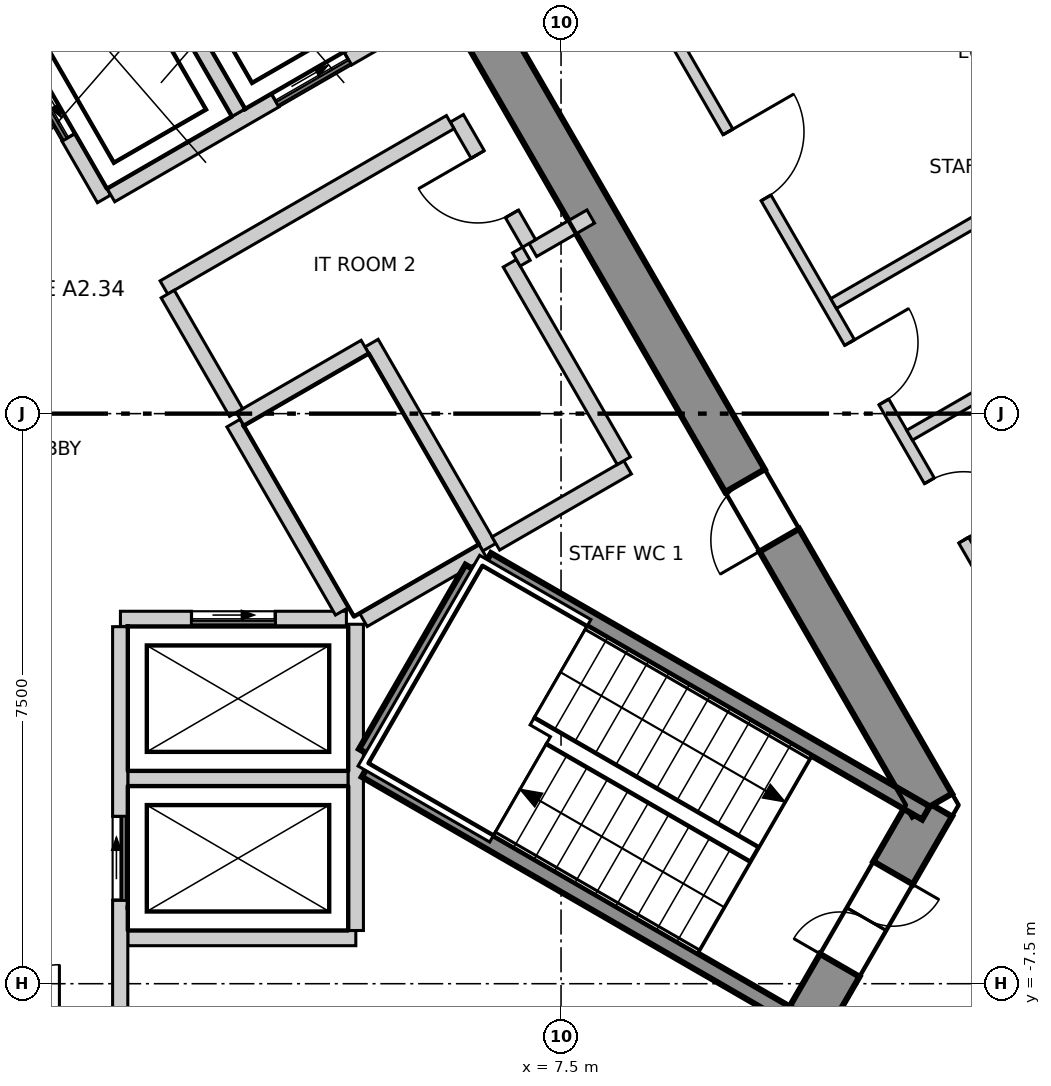
"""IFC4 building model, lengths in metres.
Left out: names, types, materials, properties, quantities, classifications, styles, units other than length and angle.
Written with IfcOpenShell. Run it as: python <this file> out.ifc"""

import sys

from ifc_helpers import new_model, si_unit, direction, frame, frame_2d, origin, place, context, subcontext, project, spatial, polyline, rectangle, outline, extrude, element, fill, save


model = new_model("IFC4")
c1 = context("Model", 3, precision=1e-05, world=origin(), true_north=direction((0.0, 1.0)))
c2 = subcontext(c1, "Body", "Model", "MODEL_VIEW")
j1 = project(units=[si_unit("LENGTHUNIT", "METRE"), si_unit("PLANEANGLEUNIT", "RADIAN")], contexts=[c1])
p1 = place(None, origin())
s1 = spatial("IfcSite", under=j1, at=p1, CompositionType="ELEMENT")
p2 = place(p1, origin())
s2 = spatial("IfcBuilding", under=s1, at=p2, CompositionType="ELEMENT")
p3 = place(p2, frame((0.0, 0.0, 289.9)))
s3 = spatial("IfcBuildingStorey", under=s2, at=p3, CompositionType="ELEMENT", Elevation=289.9)
p4 = place(p3, frame((10.652, -8.15, -0.3), z_axis=(0.0, 0.0, 1.0), x_axis=(0.49997462182, 0.866040055388, 0.0)))
e1 = element("IfcWall", 1, at=p4, inside=s3, PredefinedType="SHEAR", context=c2, shape_type="SweptSolid", body=[
    extrude(outline(polyline([(-0.173, -0.3), (1.732, -0.301), (3.638, -0.301), (3.291, 0.3), (1.732, 0.3), (0.173, 0.3), (-0.173, -0.3)])), origin(), (0.0, 0.0, 1.0), 3.6),
])
p5 = place(p4, frame((1.032, 0.0, 0.3)))
e2 = element("IfcOpeningElement", 2, at=p5, cuts=e1, PredefinedType="OPENING", context=c2, shape_type="SweptSolid", body=[
    extrude(rectangle(XDim=1.4, YDim=2.1, at=frame_2d((0.7, 1.05))), frame((0.0, 0.31, 0.0), z_axis=(0.0, -1.0, 0.0), x_axis=(1.0, 0.0, 0.0)), (0.0, 0.0, 1.0), 0.621),
])
p6 = place(p3, frame((12.384, -5.15, -0.3), z_axis=(0.0, 0.0, 1.0), x_axis=(-0.500000539815, 0.866025092122, 0.0)))
e3 = element("IfcWall", 3, at=p6, inside=s3, PredefinedType="SHEAR", context=c2, shape_type="SweptSolid", body=[
    extrude(outline(polyline([(-0.173, -0.301), (1.795, -0.301), (3.763, -0.301), (5.731, -0.301), (7.7, -0.301), (9.668, -0.301), (11.636, -0.301), (13.604, -0.3), (15.573, -0.3), (17.541, -0.3), (19.509, -0.3), (21.477, -0.3), (21.131, 0.3), (19.226, 0.3), (17.321, 0.3), (15.415, 0.3), (13.51, 0.3), (11.605, 0.3), (9.699, 0.3), (7.794, 0.3), (5.889, 0.3), (3.984, 0.3), (2.078, 0.3), (0.173, 0.3), (-0.173, -0.301)])), origin(), (0.0, 0.0, 1.0), 3.6),
])
p7 = place(p6, frame((16.378, 0.0, 0.3)))
e4 = element("IfcOpeningElement", 4, at=p7, cuts=e3, PredefinedType="OPENING", context=c2, shape_type="SweptSolid", body=[
    extrude(rectangle(XDim=0.9, YDim=2.1, at=frame_2d((0.45, 1.05))), frame((0.0, 0.31, 0.0), z_axis=(0.0, -1.0, 0.0), x_axis=(1.0, 0.0, 0.0)), (0.0, 0.0, 1.0), 0.621),
])
p8 = place(p6, frame((4.026, 0.0, 0.3)))
e5 = element("IfcOpeningElement", 5, at=p8, cuts=e3, PredefinedType="OPENING", context=c2, shape_type="SweptSolid", body=[
    extrude(rectangle(XDim=0.9, YDim=2.1, at=frame_2d((0.45, 1.05))), frame((0.0, 0.31, 0.0), z_axis=(0.0, -1.0, 0.0), x_axis=(1.0, 0.0, 0.0)), (0.0, 0.0, 1.0), 0.621),
])
p9 = place(p3, frame((25.375, -11.77, 0.0), z_axis=(0.0, 0.0, 1.0), x_axis=(-0.500008134474, 0.866020707292, 0.0)))
e6 = element("IfcWall", 6, at=p9, inside=s3, PredefinedType="ELEMENTEDWALL", context=c2, shape_type="SweptSolid", body=[
    extrude(rectangle(XDim=45.741, YDim=0.2, at=frame_2d((22.871, 0.0))), origin(), (0.0, 0.0, 1.0), 3.3),
])
p10 = place(p9, frame((2.15, 0.0, 0.9)))
e7 = element("IfcOpeningElement", 7, at=p10, cuts=e6, PredefinedType="OPENING", context=c2, shape_type="SweptSolid", body=[
    extrude(rectangle(XDim=3.7, YDim=2.2, at=frame_2d((1.85, 1.1))), frame((0.0, 0.11, 0.0), z_axis=(0.0, -1.0, 0.0), x_axis=(1.0, 0.0, 0.0)), (0.0, 0.0, 1.0), 0.22),
])
p11 = place(p9, frame((7.544, 0.0, 0.9)))
e8 = element("IfcOpeningElement", 8, at=p11, cuts=e6, PredefinedType="OPENING", context=c2, shape_type="SweptSolid", body=[
    extrude(rectangle(XDim=3.7, YDim=2.2, at=frame_2d((1.85, 1.1))), frame((0.0, 0.11, 0.0), z_axis=(0.0, -1.0, 0.0), x_axis=(1.0, 0.0, 0.0)), (0.0, 0.0, 1.0), 0.22),
])
p12 = place(p9, frame((12.939, 0.0, 0.9)))
e9 = element("IfcOpeningElement", 9, at=p12, cuts=e6, PredefinedType="OPENING", context=c2, shape_type="SweptSolid", body=[
    extrude(rectangle(XDim=3.7, YDim=2.2, at=frame_2d((1.85, 1.1))), frame((0.0, 0.11, 0.0), z_axis=(0.0, -1.0, 0.0), x_axis=(1.0, 0.0, 0.0)), (0.0, 0.0, 1.0), 0.22),
])
p13 = place(p9, frame((18.333, 0.0, 0.9)))
e10 = element("IfcOpeningElement", 10, at=p13, cuts=e6, PredefinedType="OPENING", context=c2, shape_type="SweptSolid", body=[
    extrude(rectangle(XDim=3.7, YDim=2.2, at=frame_2d((1.85, 1.1))), frame((0.0, 0.11, 0.0), z_axis=(0.0, -1.0, 0.0), x_axis=(1.0, 0.0, 0.0)), (0.0, 0.0, 1.0), 0.22),
])
p14 = place(p9, frame((23.728, 0.0, 0.9)))
e11 = element("IfcOpeningElement", 11, at=p14, cuts=e6, PredefinedType="OPENING", context=c2, shape_type="SweptSolid", body=[
    extrude(rectangle(XDim=3.7, YDim=2.2, at=frame_2d((1.85, 1.1))), frame((0.0, 0.11, 0.0), z_axis=(0.0, -1.0, 0.0), x_axis=(1.0, 0.0, 0.0)), (0.0, 0.0, 1.0), 0.22),
])
p15 = place(p9, frame((29.122, 0.0, 0.9)))
e12 = element("IfcOpeningElement", 12, at=p15, cuts=e6, PredefinedType="OPENING", context=c2, shape_type="SweptSolid", body=[
    extrude(rectangle(XDim=3.7, YDim=2.2, at=frame_2d((1.85, 1.1))), frame((0.0, 0.11, 0.0), z_axis=(0.0, -1.0, 0.0), x_axis=(1.0, 0.0, 0.0)), (0.0, 0.0, 1.0), 0.22),
])
p16 = place(p9, frame((34.517, 0.0, 0.9)))
e13 = element("IfcOpeningElement", 13, at=p16, cuts=e6, PredefinedType="OPENING", context=c2, shape_type="SweptSolid", body=[
    extrude(rectangle(XDim=3.7, YDim=2.2, at=frame_2d((1.85, 1.1))), frame((0.0, 0.11, 0.0), z_axis=(0.0, -1.0, 0.0), x_axis=(1.0, 0.0, 0.0)), (0.0, 0.0, 1.0), 0.22),
])
p17 = place(p9, frame((39.911, 0.0, 0.9)))
e14 = element("IfcOpeningElement", 14, at=p17, cuts=e6, PredefinedType="OPENING", context=c2, shape_type="SweptSolid", body=[
    extrude(rectangle(XDim=3.7, YDim=2.2, at=frame_2d((1.85, 1.1))), frame((0.0, 0.11, 0.0), z_axis=(0.0, -1.0, 0.0), x_axis=(1.0, 0.0, 0.0)), (0.0, 0.0, 1.0), 0.22),
])
p18 = place(p3, frame((0.075, 20.37, 0.0), z_axis=(0.0, 0.0, 1.0), x_axis=(0.500009775255, -0.866019759965, 0.0)))
e15 = element("IfcWall", 15, at=p18, inside=s3, PredefinedType="PARTITIONING", context=c2, shape_type="SweptSolid", body=[
    extrude(rectangle(XDim=35.207, YDim=0.15, at=frame_2d((17.604, 0.0))), origin(), (0.0, 0.0, 1.0), 3.3),
])
p19 = place(p18, frame((31.407, 0.0, 0.0)))
e16 = element("IfcOpeningElement", 16, at=p19, cuts=e15, PredefinedType="OPENING", context=c2, shape_type="SweptSolid", body=[
    extrude(rectangle(XDim=1.0, YDim=2.1, at=frame_2d((0.5, 1.05))), frame((0.0, 0.085, 0.0), z_axis=(0.0, -1.0, 0.0), x_axis=(1.0, 0.0, 0.0)), (0.0, 0.0, 1.0), 0.17),
])
p20 = place(p18, frame((19.243, 0.0, 0.0)))
e17 = element("IfcOpeningElement", 17, at=p20, cuts=e15, PredefinedType="OPENING", context=c2, shape_type="SweptSolid", body=[
    extrude(rectangle(XDim=1.0, YDim=2.1, at=frame_2d((0.5, 1.05))), frame((0.0, 0.085, 0.0), z_axis=(0.0, -1.0, 0.0), x_axis=(1.0, 0.0, 0.0)), (0.0, 0.0, 1.0), 0.17),
])
p21 = place(p18, frame((24.543, 0.0, 0.0)))
e18 = element("IfcOpeningElement", 18, at=p21, cuts=e15, PredefinedType="OPENING", context=c2, shape_type="SweptSolid", body=[
    extrude(rectangle(XDim=0.9, YDim=2.1, at=frame_2d((0.45, 1.05))), frame((0.0, 0.085, 0.0), z_axis=(0.0, -1.0, 0.0), x_axis=(1.0, 0.0, 0.0)), (0.0, 0.0, 1.0), 0.17),
])
p22 = place(p18, frame((22.443, 0.0, 0.0)))
e19 = element("IfcOpeningElement", 19, at=p22, cuts=e15, PredefinedType="OPENING", context=c2, shape_type="SweptSolid", body=[
    extrude(rectangle(XDim=0.9, YDim=2.1, at=frame_2d((0.45, 1.05))), frame((0.0, 0.085, 0.0), z_axis=(0.0, -1.0, 0.0), x_axis=(1.0, 0.0, 0.0)), (0.0, 0.0, 1.0), 0.17),
])
p23 = place(p18, frame((13.253, 0.0, 0.0)))
e20 = element("IfcOpeningElement", 20, at=p23, cuts=e15, PredefinedType="OPENING", context=c2, shape_type="SweptSolid", body=[
    extrude(rectangle(XDim=1.0, YDim=2.1, at=frame_2d((0.5, 1.05))), frame((0.0, 0.085, 0.0), z_axis=(0.0, -1.0, 0.0), x_axis=(1.0, 0.0, 0.0)), (0.0, 0.0, 1.0), 0.17),
])
p24 = place(p18, frame((5.559, 0.0, 0.0)))
e21 = element("IfcOpeningElement", 21, at=p24, cuts=e15, PredefinedType="OPENING", context=c2, shape_type="SweptSolid", body=[
    extrude(rectangle(XDim=1.0, YDim=2.1, at=frame_2d((0.5, 1.05))), frame((0.0, 0.085, 0.0), z_axis=(0.0, -1.0, 0.0), x_axis=(1.0, 0.0, 0.0)), (0.0, 0.0, 1.0), 0.17),
])
p25 = place(p3, frame((11.086, 1.448, 0.0), z_axis=(0.0, 0.0, 1.0), x_axis=(0.8660395779, 0.499975448907, 0.0)))
e22 = element("IfcWall", 22, at=p25, inside=s3, PredefinedType="PARTITIONING", context=c2, shape_type="SweptSolid", body=[
    extrude(rectangle(XDim=2.45, YDim=0.15, at=frame_2d((1.225, 0.0))), origin(), (0.0, 0.0, 1.0), 3.3),
])
p26 = place(p3, frame((12.086, -0.284, 0.0), z_axis=(0.0, 0.0, 1.0), x_axis=(0.865995540999, 0.500051720295, 0.0)))
e23 = element("IfcWall", 23, at=p26, inside=s3, PredefinedType="PARTITIONING", context=c2, shape_type="SweptSolid", body=[
    extrude(rectangle(XDim=2.845, YDim=0.15, at=frame_2d((1.423, 0.0))), origin(), (0.0, 0.0, 1.0), 3.3),
])
p27 = place(p3, frame((1.8, -6.9, 0.0), z_axis=(0.0, 0.0, 1.0), x_axis=(1.0, 0.0, 0.0)))
e24 = element("IfcWall", 24, at=p27, inside=s3, PredefinedType="SOLIDWALL", context=c2, shape_type="SweptSolid", body=[
    extrude(rectangle(XDim=3.0, YDim=0.2, at=frame_2d((1.5, 0.0))), origin(), (0.0, 0.0, 1.0), 3.3),
])
p28 = place(p3, frame((1.8, -4.8, 0.0), z_axis=(0.0, 0.0, 1.0), x_axis=(1.0, 0.0, 0.0)))
e25 = element("IfcWall", 25, at=p28, inside=s3, PredefinedType="SOLIDWALL", context=c2, shape_type="SweptSolid", body=[
    extrude(rectangle(XDim=2.9, YDim=0.2, at=frame_2d((1.45, 0.0))), origin(), (0.0, 0.0, 1.0), 3.3),
])
p29 = place(p3, frame((1.703, -2.7, 0.0), z_axis=(0.0, 0.0, 1.0), x_axis=(1.0, 0.0, 0.0)))
e26 = element("IfcWall", 26, at=p29, inside=s3, PredefinedType="SOLIDWALL", context=c2, shape_type="SweptSolid", body=[
    extrude(rectangle(XDim=2.973, YDim=0.2, at=frame_2d((1.487, 0.0))), origin(), (0.0, 0.0, 1.0), 3.3),
])
p30 = place(p29, frame((0.936, 0.0, 0.0)))
e27 = element("IfcOpeningElement", 27, at=p30, cuts=e26, PredefinedType="OPENING", context=c2, shape_type="SweptSolid", body=[
    extrude(rectangle(XDim=1.1, YDim=2.1, at=frame_2d((0.55, 1.05))), frame((0.0, 0.11, 0.0), z_axis=(0.0, -1.0, 0.0), x_axis=(1.0, 0.0, 0.0)), (0.0, 0.0, 1.0), 0.22),
])
p31 = place(p3, frame((0.0, 5.4, 0.0), z_axis=(0.0, 0.0, 1.0), x_axis=(0.500103862429, -0.865965430478, 0.0)))
e28 = element("IfcWall", 28, at=p31, inside=s3, PredefinedType="SOLIDWALL", context=c2, shape_type="SweptSolid", body=[
    extrude(rectangle(XDim=2.973, YDim=0.2, at=frame_2d((1.487, 0.0))), origin(), (0.0, 0.0, 1.0), 3.3),
])
p32 = place(p31, frame((0.937, 0.0, 0.0)))
e29 = element("IfcOpeningElement", 29, at=p32, cuts=e28, PredefinedType="OPENING", context=c2, shape_type="SweptSolid", body=[
    extrude(rectangle(XDim=1.1, YDim=2.1, at=frame_2d((0.55, 1.05))), frame((0.0, 0.11, 0.0), z_axis=(0.0, -1.0, 0.0), x_axis=(1.0, 0.0, 0.0)), (0.0, 0.0, 1.0), 0.22),
])
p33 = place(p3, frame((3.19, -0.125, 0.0), z_axis=(0.0, 0.0, 1.0), x_axis=(0.499988658015, -0.866031951983, 0.0)))
e30 = element("IfcWall", 30, at=p33, inside=s3, PredefinedType="SOLIDWALL", context=c2, shape_type="SweptSolid", body=[
    extrude(rectangle(XDim=2.858, YDim=0.2, at=frame_2d((1.429, 0.0))), origin(), (0.0, 0.0, 1.0), 3.3),
])
p34 = place(p3, frame((1.578, 2.874, 0.0), z_axis=(0.0, 0.0, 1.0), x_axis=(0.866045911672, 0.499964477614, 0.0)))
e31 = element("IfcWall", 31, at=p34, inside=s3, PredefinedType="SOLIDWALL", context=c2, shape_type="SweptSolid", body=[
    extrude(rectangle(XDim=5.327, YDim=0.2, at=frame_2d((2.663, 0.0))), origin(), (0.0, 0.0, 1.0), 3.3),
])
p35 = place(p34, frame((2.496, 0.0, 0.0)))
e32 = element("IfcOpeningElement", 32, at=p35, cuts=e31, PredefinedType="OPENING", context=c2, shape_type="SweptSolid", body=[
    extrude(rectangle(XDim=1.1, YDim=2.1, at=frame_2d((0.55, 1.05))), frame((0.0, 0.11, 0.0), z_axis=(0.0, -1.0, 0.0), x_axis=(1.0, 0.0, 0.0)), (0.0, 0.0, 1.0), 0.22),
])
p36 = place(p3, frame((1.7, -8.13, 0.0), z_axis=(0.0, 0.0, 1.0), x_axis=(0.0, 1.0, 0.0)))
e33 = element("IfcWall", 33, at=p36, inside=s3, PredefinedType="SOLIDWALL", context=c2, shape_type="SweptSolid", body=[
    extrude(rectangle(XDim=5.327, YDim=0.2, at=frame_2d((2.664, 0.0))), origin(), (0.0, 0.0, 1.0), 3.3),
])
p37 = place(p36, frame((1.73, 0.0, 0.0)))
e34 = element("IfcOpeningElement", 34, at=p37, cuts=e33, PredefinedType="OPENING", context=c2, shape_type="SweptSolid", body=[
    extrude(rectangle(XDim=1.1, YDim=2.1, at=frame_2d((0.55, 1.05))), frame((0.0, 0.11, 0.0), z_axis=(0.0, -1.0, 0.0), x_axis=(1.0, 0.0, 0.0)), (0.0, 0.0, 1.0), 0.22),
])
p38 = place(p3, frame((4.8, -6.8, 0.0), z_axis=(0.0, 0.0, 1.0), x_axis=(0.0, 1.0, 0.0)))
e35 = element("IfcWall", 35, at=p38, inside=s3, PredefinedType="SOLIDWALL", context=c2, shape_type="SweptSolid", body=[
    extrude(rectangle(XDim=4.029, YDim=0.2, at=frame_2d((2.015, 0.0))), origin(), (0.0, 0.0, 1.0), 3.3),
])
p39 = place(p3, frame((1.807, 6.47, 0.0), z_axis=(0.0, 0.0, 1.0), x_axis=(0.50012328804, -0.865954211699, 0.0)))
e36 = element("IfcWall", 36, at=p39, inside=s3, PredefinedType="SOLIDWALL", context=c2, shape_type="SweptSolid", body=[
    extrude(rectangle(XDim=2.9, YDim=0.2, at=frame_2d((1.45, 0.0))), origin(), (0.0, 0.0, 1.0), 3.3),
])
p40 = place(p3, frame((5.007, 0.928, 0.0), z_axis=(0.0, 0.0, 1.0), x_axis=(0.499899694197, -0.866083307622, 0.0)))
e37 = element("IfcWall", 37, at=p40, inside=s3, PredefinedType="SOLIDWALL", context=c2, shape_type="SweptSolid", body=[
    extrude(rectangle(XDim=3.1, YDim=0.2, at=frame_2d((1.55, 0.0))), origin(), (0.0, 0.0, 1.0), 3.3),
])
p41 = place(p3, frame((3.278, -0.071, 0.0), z_axis=(0.0, 0.0, 1.0), x_axis=(0.865784509405, 0.500417009377, 0.0)))
e38 = element("IfcWall", 38, at=p41, inside=s3, PredefinedType="SOLIDWALL", context=c2, shape_type="SweptSolid", body=[
    extrude(rectangle(XDim=1.896, YDim=0.2, at=frame_2d((0.948, 0.0))), origin(), (0.0, 0.0, 1.0), 3.3),
])
p42 = place(p3, frame((7.129, 2.153, 0.0), z_axis=(0.0, 0.0, 1.0), x_axis=(0.866083962871, 0.499898558967, 0.0)))
e39 = element("IfcWall", 39, at=p42, inside=s3, PredefinedType="SOLIDWALL", context=c2, shape_type="SweptSolid", body=[
    extrude(rectangle(XDim=0.88, YDim=0.2, at=frame_2d((0.44, 0.0))), origin(), (0.0, 0.0, 1.0), 3.3),
])
p43 = place(p3, frame((6.129, 3.885, 0.0), z_axis=(0.0, 0.0, 1.0), x_axis=(0.499952260202, -0.866052964615, 0.0)))
e40 = element("IfcWall", 40, at=p43, inside=s3, PredefinedType="SOLIDWALL", context=c2, shape_type="SweptSolid", body=[
    extrude(rectangle(XDim=1.901, YDim=0.2, at=frame_2d((0.95, 0.0))), origin(), (0.0, 0.0, 1.0), 3.3),
])
p44 = place(p43, frame((0.55, 0.0, 0.0)))
e41 = element("IfcOpeningElement", 41, at=p44, cuts=e40, PredefinedType="OPENING", context=c2, shape_type="SweptSolid", body=[
    extrude(rectangle(XDim=0.9, YDim=2.1, at=frame_2d((0.45, 1.05))), frame((0.0, 0.11, 0.0), z_axis=(0.0, -1.0, 0.0), x_axis=(1.0, 0.0, 0.0)), (0.0, 0.0, 1.0), 0.22),
])
p45 = place(p3, frame((2.275, 1.66, 0.0), z_axis=(0.0, 0.0, 1.0), x_axis=(0.866013608182, 0.500020430026, 0.0)))
e42 = element("IfcWall", 42, at=p45, inside=s3, PredefinedType="SOLIDWALL", context=c2, shape_type="SweptSolid", body=[
    extrude(rectangle(XDim=4.35, YDim=0.2, at=frame_2d((2.175, 0.0))), origin(), (0.0, 0.0, 1.0), 3.3),
])
p46 = place(p3, frame((2.325, 1.573, 0.0), z_axis=(0.0, 0.0, 1.0), x_axis=(0.500004188491, -0.866022985545, 0.0)))
e43 = element("IfcWall", 43, at=p46, inside=s3, PredefinedType="SOLIDWALL", context=c2, shape_type="SweptSolid", body=[
    extrude(rectangle(XDim=1.8, YDim=0.2, at=frame_2d((0.9, 0.0))), origin(), (0.0, 0.0, 1.0), 3.3),
])
p47 = place(p3, frame((4.9, -2.714, 0.0), z_axis=(0.0, 0.0, 1.0), x_axis=(0.865846928409, 0.500309001083, 0.0)))
e44 = element("IfcWall", 44, at=p47, inside=s3, PredefinedType="SOLIDWALL", context=c2, shape_type="SweptSolid", body=[
    extrude(rectangle(XDim=1.813, YDim=0.2, at=frame_2d((0.907, 0.0))), origin(), (0.0, 0.0, 1.0), 3.3),
])
p48 = place(p3, frame((6.642, -1.708, 0.0), z_axis=(0.0, 0.0, 1.0), x_axis=(0.866043441391, 0.499968756647, 0.0)))
e45 = element("IfcWall", 45, at=p48, inside=s3, PredefinedType="SOLIDWALL", context=c2, shape_type="SweptSolid", body=[
    extrude(rectangle(XDim=2.002, YDim=0.2, at=frame_2d((1.001, 0.0))), origin(), (0.0, 0.0, 1.0), 3.3),
])
p49 = place(p3, frame((6.826, 1.978, 0.0), z_axis=(0.0, 0.0, 1.0), x_axis=(0.499990139034, -0.866031096941, 0.0)))
e46 = element("IfcWall", 46, at=p49, inside=s3, PredefinedType="SOLIDWALL", context=c2, shape_type="SweptSolid", body=[
    extrude(rectangle(XDim=3.0, YDim=0.2, at=frame_2d((1.5, 0.0))), origin(), (0.0, 0.0, 1.0), 3.3),
])
p50 = place(p3, frame((6.912, 2.028, 0.0), z_axis=(0.0, 0.0, 1.0), x_axis=(0.866559367082, 0.499074005857, 0.0)))
e47 = element("IfcWall", 47, at=p50, inside=s3, PredefinedType="SOLIDWALL", context=c2, shape_type="SweptSolid", body=[
    extrude(rectangle(XDim=0.152, YDim=0.2, at=frame_2d((0.076, 0.0))), origin(), (0.0, 0.0, 1.0), 3.3),
])
p51 = place(p3, frame((4.929, -4.693, 0.0), z_axis=(0.0, 0.0, 1.0), x_axis=(0.866005022404, -0.500035299925, 0.0)))
e48 = element("IfcWall", 48, at=p51, inside=s3, PredefinedType="SOLIDWALL", context=c2, shape_type="SweptSolid", body=[
    extrude(rectangle(XDim=6.665, YDim=0.2, at=frame_2d((3.333, 0.0))), origin(), (0.0, 0.0, 1.0), 3.3),
])
p52 = place(p3, frame((4.929, -4.462, 0.0), z_axis=(0.0, 0.0, 1.0), x_axis=(0.500200581029, 0.865909567298, 0.0)))
e49 = element("IfcWall", 49, at=p52, inside=s3, PredefinedType="SOLIDWALL", context=c2, shape_type="SweptSolid", body=[
    extrude(rectangle(XDim=2.799, YDim=0.2, at=frame_2d((1.399, 0.0))), origin(), (0.0, 0.0, 1.0), 3.3),
])
p53 = place(p3, frame((6.529, -1.922, 0.0), z_axis=(0.0, 0.0, 1.0), x_axis=(0.866068467981, -0.499925403204, 0.0)))
e50 = element("IfcWall", 50, at=p53, inside=s3, PredefinedType="SOLIDWALL", context=c2, shape_type="SweptSolid", body=[
    extrude(rectangle(XDim=6.665, YDim=0.2, at=frame_2d((3.332, 0.0))), origin(), (0.0, 0.0, 1.0), 3.3),
])
p54 = place(p30, origin())
e51 = element("IfcDoor", 51, at=p54, inside=s3, OperationType="SLIDING_TO_LEFT", PredefinedType="DOOR", context=c2, shape_type="SweptSolid", body=[
    extrude(rectangle(XDim=1.1, YDim=2.1, at=frame_2d((0.55, 1.05))), frame((0.0, 0.025, 0.0), z_axis=(0.0, -1.0, 0.0), x_axis=(1.0, 0.0, 0.0)), (0.0, 0.0, 1.0), 0.05),
])
fill(e27, e51)
p55 = place(p37, origin())
e52 = element("IfcDoor", 52, at=p55, inside=s3, OperationType="SLIDING_TO_LEFT", PredefinedType="DOOR", context=c2, shape_type="SweptSolid", body=[
    extrude(rectangle(XDim=1.1, YDim=2.1, at=frame_2d((0.55, 1.05))), frame((0.0, 0.025, 0.0), z_axis=(0.0, -1.0, 0.0), x_axis=(1.0, 0.0, 0.0)), (0.0, 0.0, 1.0), 0.05),
])
fill(e34, e52)
p56 = place(p32, origin())
e53 = element("IfcDoor", 53, at=p56, inside=s3, OperationType="SLIDING_TO_LEFT", PredefinedType="DOOR", context=c2, shape_type="SweptSolid", body=[
    extrude(rectangle(XDim=1.1, YDim=2.1, at=frame_2d((0.55, 1.05))), frame((0.0, 0.025, 0.0), z_axis=(0.0, -1.0, 0.0), x_axis=(1.0, 0.0, 0.0)), (0.0, 0.0, 1.0), 0.05),
])
fill(e29, e53)
p57 = place(p35, origin())
e54 = element("IfcDoor", 54, at=p57, inside=s3, OperationType="SLIDING_TO_LEFT", PredefinedType="DOOR", context=c2, shape_type="SweptSolid", body=[
    extrude(rectangle(XDim=1.1, YDim=2.1, at=frame_2d((0.55, 1.05))), frame((0.0, 0.025, 0.0), z_axis=(0.0, -1.0, 0.0), x_axis=(1.0, 0.0, 0.0)), (0.0, 0.0, 1.0), 0.05),
])
fill(e32, e54)
p58 = place(p20, origin())
e55 = element("IfcDoor", 55, at=p58, inside=s3, OperationType="SINGLE_SWING_RIGHT", PredefinedType="DOOR", context=c2, shape_type="SweptSolid", body=[
    extrude(rectangle(XDim=1.0, YDim=2.1, at=frame_2d((0.5, 1.05))), frame((0.0, 0.025, 0.0), z_axis=(0.0, -1.0, 0.0), x_axis=(1.0, 0.0, 0.0)), (0.0, 0.0, 1.0), 0.05),
])
fill(e17, e55)
p59 = place(p21, origin())
e56 = element("IfcDoor", 56, at=p59, inside=s3, OperationType="SINGLE_SWING_LEFT", PredefinedType="DOOR", context=c2, shape_type="SweptSolid", body=[
    extrude(rectangle(XDim=0.9, YDim=2.1, at=frame_2d((0.45, 1.05))), frame((0.0, 0.025, 0.0), z_axis=(0.0, -1.0, 0.0), x_axis=(1.0, 0.0, 0.0)), (0.0, 0.0, 1.0), 0.05),
])
fill(e18, e56)
p60 = place(p22, origin())
e57 = element("IfcDoor", 57, at=p60, inside=s3, OperationType="SINGLE_SWING_RIGHT", PredefinedType="DOOR", context=c2, shape_type="SweptSolid", body=[
    extrude(rectangle(XDim=0.9, YDim=2.1, at=frame_2d((0.45, 1.05))), frame((0.0, 0.025, 0.0), z_axis=(0.0, -1.0, 0.0), x_axis=(1.0, 0.0, 0.0)), (0.0, 0.0, 1.0), 0.05),
])
fill(e19, e57)
p61 = place(p5, origin())
e58 = element("IfcDoor", 58, at=p61, inside=s3, OperationType="DOUBLE_DOOR_SINGLE_SWING", PredefinedType="DOOR", context=c2, shape_type="SweptSolid", body=[
    extrude(rectangle(XDim=1.4, YDim=2.1, at=frame_2d((0.7, 1.05))), frame((0.0, 0.025, 0.0), z_axis=(0.0, -1.0, 0.0), x_axis=(1.0, 0.0, 0.0)), (0.0, 0.0, 1.0), 0.05),
])
fill(e2, e58)
p62 = place(p8, origin())
e59 = element("IfcDoor", 59, at=p62, inside=s3, OperationType="SINGLE_SWING_RIGHT", PredefinedType="DOOR", context=c2, shape_type="SweptSolid", body=[
    extrude(rectangle(XDim=0.9, YDim=2.1, at=frame_2d((0.45, 1.05))), frame((0.0, 0.025, 0.0), z_axis=(0.0, -1.0, 0.0), x_axis=(1.0, 0.0, 0.0)), (0.0, 0.0, 1.0), 0.05),
])
fill(e5, e59)
p63 = place(p44, origin())
e60 = element("IfcDoor", 60, at=p63, inside=s3, OperationType="SINGLE_SWING_LEFT", PredefinedType="DOOR", context=c2, shape_type="SweptSolid", body=[
    extrude(rectangle(XDim=0.9, YDim=2.1, at=frame_2d((0.45, 1.05))), frame((0.0, 0.025, 0.0), z_axis=(0.0, -1.0, 0.0), x_axis=(1.0, 0.0, 0.0)), (0.0, 0.0, 1.0), 0.05),
])
fill(e41, e60)
save(model, sys.argv[1])
